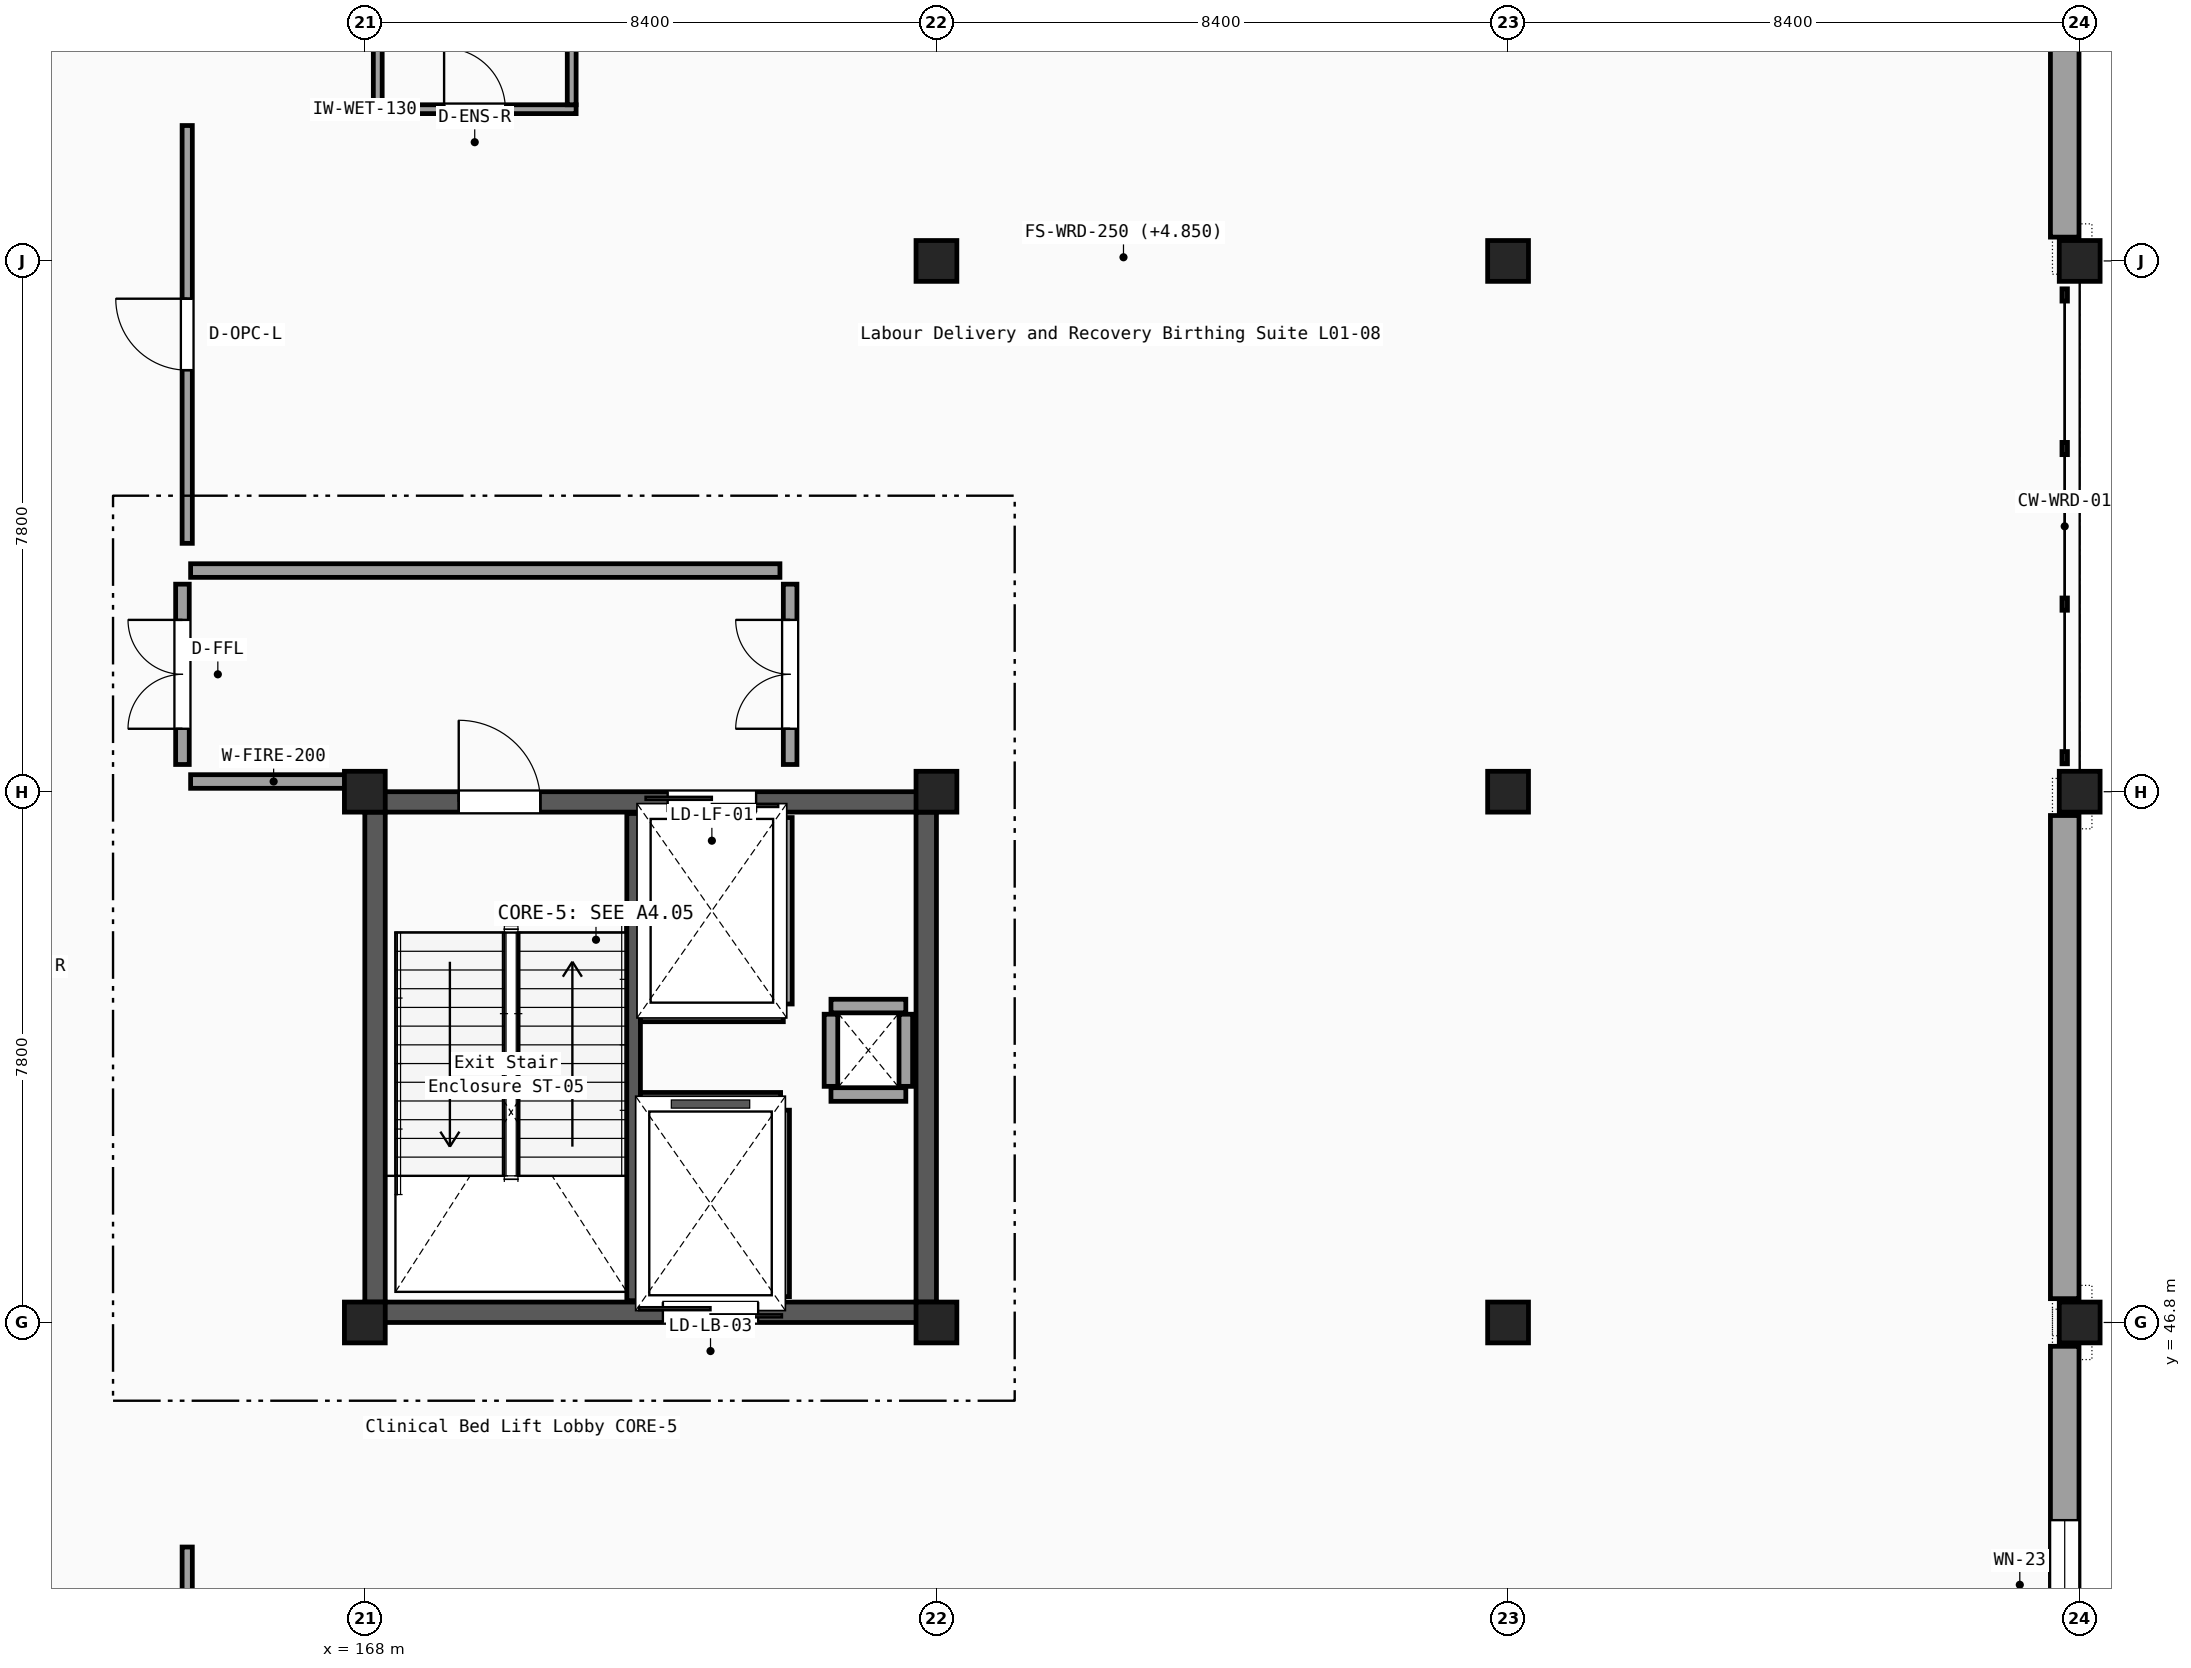
"""IFC4 building model, lengths in metres.
Left out: names, types, materials, properties, quantities, classifications, styles, units other than length and angle.
Written with IfcOpenShell. Run it as: python <this file> out.ifc"""

import sys

from ifc_helpers import new_model, si_unit, direction, frame, frame_2d, origin, origin_2d, place, context, subcontext, project, spatial, rectangle, i_section, extrude, element, fill, save


model = new_model("IFC4")
c1 = context("Model", 3, precision=1e-05, world=origin(), true_north=direction((0.0, 1.0)))
c2 = subcontext(c1, "Body", "Model", "MODEL_VIEW")
j1 = project(units=[si_unit("LENGTHUNIT", "METRE"), si_unit("PLANEANGLEUNIT", "RADIAN")], contexts=[c1])
p1 = place(None, origin())
s1 = spatial("IfcSite", under=j1, at=p1, CompositionType="ELEMENT")
p2 = place(p1, origin())
s2 = spatial("IfcBuilding", under=s1, at=p2, CompositionType="ELEMENT")
p3 = place(p2, frame((0.0, 0.0, 5.1)))
s3 = spatial("IfcBuildingStorey", under=s2, at=p3, CompositionType="ELEMENT", Elevation=5.1)
for number, where, z_axis, x_axis in (
    (1, (168.0, 46.8, 0.0), (0.0, 0.0, 1.0), (1.0, 0.0, 0.0)),
    (2, (168.0, 54.6, 0.0), (0.0, 0.0, 1.0), (1.0, 0.0, 0.0)),
    (3, (176.4, 46.8, 0.0), (0.0, 0.0, 1.0), (1.0, 0.0, 0.0)),
    (4, (176.4, 54.6, 0.0), (0.0, 0.0, 1.0), (1.0, 0.0, 0.0)),
    (5, (176.4, 62.4, 0.0), (0.0, 0.0, 1.0), (1.0, 0.0, 0.0)),
    (6, (184.8, 46.8, 0.0), (0.0, 0.0, 1.0), (1.0, 0.0, 0.0)),
    (7, (184.8, 54.6, 0.0), (0.0, 0.0, 1.0), (1.0, 0.0, 0.0)),
    (8, (184.8, 62.4, 0.0), (0.0, 0.0, 1.0), (1.0, 0.0, 0.0)),
    (9, (193.2, 46.8, 0.0), (0.0, 0.0, 1.0), (1.0, 0.0, 0.0)),
    (10, (193.2, 54.6, 0.0), (0.0, 0.0, 1.0), (1.0, 0.0, 0.0)),
    (11, (193.2, 62.4, 0.0), (0.0, 0.0, 1.0), (1.0, 0.0, 0.0)),
):
    element("IfcColumn", number, at=place(p3, frame(where, z_axis=z_axis, x_axis=x_axis)), inside=s3, PredefinedType="COLUMN", context=c2, shape_type="SweptSolid", body=[
        extrude(i_section(OverallWidth=0.3, OverallDepth=0.6, WebThickness=0.015, FlangeThickness=0.03, FilletRadius=0.027, at=origin_2d()), origin(), (0.0, 0.0, 1.0), 5.1),
    ])
p4 = place(p3, frame((192.98, 39.44, 0.0), z_axis=(0.0, 0.0, 1.0), x_axis=(0.0, 1.0, 0.0)))
e12 = element("IfcWall", 12, at=p4, inside=s3, PredefinedType="SOLIDWALL", context=c2, shape_type="SweptSolid", body=[
    extrude(rectangle(XDim=7.01, YDim=0.42, at=frame_2d((3.505, 0.0))), origin(), (0.0, 0.0, 1.0), 4.33),
])
p5 = place(p4, frame((2.555, 0.0, 0.85)))
e13 = element("IfcOpeningElement", 13, at=p5, cuts=e12, PredefinedType="OPENING", context=c2, shape_type="SweptSolid", body=[
    extrude(rectangle(XDim=1.9, YDim=1.65, at=frame_2d((0.95, 0.825))), frame((0.0, 0.22, 0.0), z_axis=(0.0, -1.0, 0.0), x_axis=(1.0, 0.0, 0.0)), (0.0, 0.0, 1.0), 0.44),
])
for number, where, z_axis, x_axis in (
    (14, (192.98, 47.15, 0.0), (0.0, 0.0, 1.0), (0.0, 1.0, 0.0)),
    (15, (192.98, 62.75, 0.0), (0.0, 0.0, 1.0), (0.0, 1.0, 0.0)),
):
    element("IfcWall", number, at=place(p3, frame(where, z_axis=z_axis, x_axis=x_axis)), inside=s3, PredefinedType="SOLIDWALL", context=c2, shape_type="SweptSolid", body=[
        extrude(rectangle(XDim=7.1, YDim=0.42, at=frame_2d((3.55, 0.0))), origin(), (0.0, 0.0, 1.0), 4.33),
    ])
p6 = place(p3, frame((168.0, 46.95, 0.0), z_axis=(0.0, 0.0, 1.0), x_axis=(1.0, 0.0, 0.0)))
e16 = element("IfcWall", 16, at=p6, inside=s3, PredefinedType="SHEAR", context=c2, shape_type="SweptSolid", body=[
    extrude(rectangle(XDim=8.4, YDim=0.3, at=frame_2d((4.2, 0.0))), origin(), (0.0, 0.0, 1.0), 4.85),
])
p7 = place(p6, frame((4.38, 0.0, 0.0)))
e17 = element("IfcOpeningElement", 17, at=p7, cuts=e16, PredefinedType="OPENING", context=c2, shape_type="SweptSolid", body=[
    extrude(rectangle(XDim=1.4, YDim=2.2, at=frame_2d((0.7, 1.1))), frame((0.0, 0.16, 0.0), z_axis=(0.0, -1.0, 0.0), x_axis=(1.0, 0.0, 0.0)), (0.0, 0.0, 1.0), 0.32),
])
p8 = place(p3, frame((168.0, 54.45, 0.0), z_axis=(0.0, 0.0, 1.0), x_axis=(1.0, 0.0, 0.0)))
e18 = element("IfcWall", 18, at=p8, inside=s3, PredefinedType="SHEAR", context=c2, shape_type="SweptSolid", body=[
    extrude(rectangle(XDim=8.4, YDim=0.3, at=frame_2d((4.2, 0.0))), origin(), (0.0, 0.0, 1.0), 4.85),
])
p9 = place(p8, frame((1.38, 0.0, 0.0)))
e19 = element("IfcOpeningElement", 19, at=p9, cuts=e18, PredefinedType="OPENING", context=c2, shape_type="SweptSolid", body=[
    extrude(rectangle(XDim=1.2, YDim=2.15, at=frame_2d((0.6, 1.075))), frame((0.0, 0.16, 0.0), z_axis=(0.0, -1.0, 0.0), x_axis=(1.0, 0.0, 0.0)), (0.0, 0.0, 1.0), 0.32),
])
p10 = place(p8, frame((4.45, 0.0, 0.0)))
e20 = element("IfcOpeningElement", 20, at=p10, cuts=e18, PredefinedType="OPENING", context=c2, shape_type="SweptSolid", body=[
    extrude(rectangle(XDim=1.3, YDim=2.2, at=frame_2d((0.65, 1.1))), frame((0.0, 0.16, 0.0), z_axis=(0.0, -1.0, 0.0), x_axis=(1.0, 0.0, 0.0)), (0.0, 0.0, 1.0), 0.32),
])
for number, where, z_axis, x_axis in (
    (21, (168.15, 47.1, 0.0), (0.0, 0.0, 1.0), (0.0, 1.0, 0.0)),
    (22, (176.25, 47.1, 0.0), (0.0, 0.0, 1.0), (0.0, 1.0, 0.0)),
):
    element("IfcWall", number, at=place(p3, frame(where, z_axis=z_axis, x_axis=x_axis)), inside=s3, PredefinedType="SHEAR", context=c2, shape_type="SweptSolid", body=[
        extrude(rectangle(XDim=7.2, YDim=0.3, at=frame_2d((3.6, 0.0))), origin(), (0.0, 0.0, 1.0), 4.85),
    ])
p11 = place(p3, frame((171.95, 47.12, 0.0), z_axis=(0.0, 0.0, 1.0), x_axis=(0.0, 1.0, 0.0)))
e23 = element("IfcWall", 23, at=p11, inside=s3, PredefinedType="SHEAR", context=c2, shape_type="SweptSolid", body=[
    extrude(rectangle(XDim=7.16, YDim=0.2, at=frame_2d((3.58, 0.0))), origin(), (0.0, 0.0, 1.0), 4.85),
])
for number, where, z_axis, x_axis in (
    (24, (174.85, 50.15, 0.0), (0.0, 0.0, 1.0), (1.0, 0.0, 0.0)),
    (25, (174.85, 51.45, 0.0), (0.0, 0.0, 1.0), (1.0, 0.0, 0.0)),
):
    element("IfcWall", number, at=place(p3, frame(where, z_axis=z_axis, x_axis=x_axis)), inside=s3, PredefinedType="PARTITIONING", context=c2, shape_type="SweptSolid", body=[
        extrude(rectangle(XDim=1.1, YDim=0.2, at=frame_2d((0.55, 0.0))), origin(), (0.0, 0.0, 1.0), 4.33),
    ])
for number, where, z_axis, x_axis in (
    (26, (174.85, 50.27, 0.0), (0.0, 0.0, 1.0), (0.0, 1.0, 0.0)),
    (27, (175.95, 50.27, 0.0), (0.0, 0.0, 1.0), (0.0, 1.0, 0.0)),
):
    element("IfcWall", number, at=place(p3, frame(where, z_axis=z_axis, x_axis=x_axis)), inside=s3, PredefinedType="PARTITIONING", context=c2, shape_type="SweptSolid", body=[
        extrude(rectangle(XDim=1.06, YDim=0.2, at=frame_2d((0.53, 0.0))), origin(), (0.0, 0.0, 1.0), 4.33),
    ])
p12 = place(p3, frame((174.18, 51.48, 0.0), z_axis=(0.0, 0.0, 1.0), x_axis=(0.0, 1.0, 0.0)))
e28 = element("IfcWall", 28, at=p12, inside=s3, PredefinedType="PARTITIONING", context=c2, shape_type="SweptSolid", body=[
    extrude(rectangle(XDim=2.74, YDim=0.2, at=frame_2d((1.37, 0.0))), origin(), (0.0, 0.0, 1.0), 4.33),
])
p13 = place(p3, frame((172.05, 51.32, 0.0), z_axis=(0.0, 0.0, 1.0), x_axis=(1.0, 0.0, 0.0)))
e29 = element("IfcWall", 29, at=p13, inside=s3, PredefinedType="PARTITIONING", context=c2, shape_type="SweptSolid", body=[
    extrude(rectangle(XDim=2.1, YDim=0.2, at=frame_2d((1.05, 0.0))), origin(), (0.0, 0.0, 1.0), 4.33),
])
p14 = place(p3, frame((174.14, 47.18, 0.0), z_axis=(0.0, 0.0, 1.0), x_axis=(0.0, 1.0, 0.0)))
e30 = element("IfcWall", 30, at=p14, inside=s3, PredefinedType="PARTITIONING", context=c2, shape_type="SweptSolid", body=[
    extrude(rectangle(XDim=2.74, YDim=0.2, at=frame_2d((1.37, 0.0))), origin(), (0.0, 0.0, 1.0), 4.33),
])
p15 = place(p3, frame((172.05, 50.08, 0.0), z_axis=(0.0, 0.0, 1.0), x_axis=(1.0, 0.0, 0.0)))
e31 = element("IfcWall", 31, at=p15, inside=s3, PredefinedType="PARTITIONING", context=c2, shape_type="SweptSolid", body=[
    extrude(rectangle(XDim=2.06, YDim=0.2, at=frame_2d((1.03, 0.0))), origin(), (0.0, 0.0, 1.0), 4.33),
])
p16 = place(p3, frame((165.44, 54.75, 0.0), z_axis=(0.0, 0.0, 1.0), x_axis=(1.0, 0.0, 0.0)))
e32 = element("IfcWall", 32, at=p16, inside=s3, PredefinedType="PARTITIONING", context=c2, shape_type="SweptSolid", body=[
    extrude(rectangle(XDim=2.44, YDim=0.2, at=frame_2d((1.22, 0.0))), origin(), (0.0, 0.0, 1.0), 4.33),
])
p17 = place(p3, frame((165.44, 57.85, 0.0), z_axis=(0.0, 0.0, 1.0), x_axis=(1.0, 0.0, 0.0)))
e33 = element("IfcWall", 33, at=p17, inside=s3, PredefinedType="PARTITIONING", context=c2, shape_type="SweptSolid", body=[
    extrude(rectangle(XDim=8.66, YDim=0.2, at=frame_2d((4.33, 0.0))), origin(), (0.0, 0.0, 1.0), 4.33),
])
p18 = place(p3, frame((165.32, 55.0, 0.0), z_axis=(0.0, 0.0, 1.0), x_axis=(0.0, 1.0, 0.0)))
e34 = element("IfcWall", 34, at=p18, inside=s3, PredefinedType="PARTITIONING", context=c2, shape_type="SweptSolid", body=[
    extrude(rectangle(XDim=2.65, YDim=0.2, at=frame_2d((1.325, 0.0))), origin(), (0.0, 0.0, 1.0), 4.33),
])
p19 = place(p18, frame((0.525, 0.0, 0.0)))
e35 = element("IfcOpeningElement", 35, at=p19, cuts=e34, PredefinedType="OPENING", context=c2, shape_type="SweptSolid", body=[
    extrude(rectangle(XDim=1.6, YDim=2.2, at=frame_2d((0.8, 1.1))), frame((0.0, 0.11, 0.0), z_axis=(0.0, -1.0, 0.0), x_axis=(1.0, 0.0, 0.0)), (0.0, 0.0, 1.0), 0.22),
])
p20 = place(p3, frame((174.25, 55.0, 0.0), z_axis=(0.0, 0.0, 1.0), x_axis=(0.0, 1.0, 0.0)))
e36 = element("IfcWall", 36, at=p20, inside=s3, PredefinedType="PARTITIONING", context=c2, shape_type="SweptSolid", body=[
    extrude(rectangle(XDim=2.65, YDim=0.2, at=frame_2d((1.325, 0.0))), origin(), (0.0, 0.0, 1.0), 4.33),
])
p21 = place(p20, frame((0.525, 0.0, 0.0)))
e37 = element("IfcOpeningElement", 37, at=p21, cuts=e36, PredefinedType="OPENING", context=c2, shape_type="SweptSolid", body=[
    extrude(rectangle(XDim=1.6, YDim=2.2, at=frame_2d((0.8, 1.1))), frame((0.0, 0.11, 0.0), z_axis=(0.0, -1.0, 0.0), x_axis=(1.0, 0.0, 0.0)), (0.0, 0.0, 1.0), 0.22),
])
p22 = place(p3, frame((165.39, 39.62, 0.0), z_axis=(0.0, 0.0, 1.0), x_axis=(0.0, 1.0, 0.0)))
e38 = element("IfcWall", 38, at=p22, inside=s3, PredefinedType="PARTITIONING", context=c2, shape_type="SweptSolid", body=[
    extrude(rectangle(XDim=3.88, YDim=0.15, at=frame_2d((1.94, 0.0))), origin(), (0.0, 0.0, 1.0), 4.82),
])
p23 = place(p22, frame((1.24, 0.0, 0.0)))
e39 = element("IfcOpeningElement", 39, at=p23, cuts=e38, PredefinedType="OPENING", context=c2, shape_type="SweptSolid", body=[
    extrude(rectangle(XDim=1.4, YDim=2.2, at=frame_2d((0.7, 1.1))), frame((0.0, 0.085, 0.0), z_axis=(0.0, -1.0, 0.0), x_axis=(1.0, 0.0, 0.0)), (0.0, 0.0, 1.0), 0.17),
])
p24 = place(p3, frame((165.39, 58.25, 0.0), z_axis=(0.0, 0.0, 1.0), x_axis=(0.0, 1.0, 0.0)))
e40 = element("IfcWall", 40, at=p24, inside=s3, PredefinedType="PARTITIONING", context=c2, shape_type="SweptSolid", body=[
    extrude(rectangle(XDim=6.14, YDim=0.15, at=frame_2d((3.07, 0.0))), origin(), (0.0, 0.0, 1.0), 4.33),
])
p25 = place(p24, frame((2.545, 0.0, 0.0)))
e41 = element("IfcOpeningElement", 41, at=p25, cuts=e40, PredefinedType="OPENING", context=c2, shape_type="SweptSolid", body=[
    extrude(rectangle(XDim=1.05, YDim=2.15, at=frame_2d((0.525, 1.075))), frame((0.0, 0.085, 0.0), z_axis=(0.0, -1.0, 0.0), x_axis=(1.0, 0.0, 0.0)), (0.0, 0.0, 1.0), 0.17),
])
p26 = place(p3, frame((168.125, 64.63, 0.0), z_axis=(0.0, 0.0, 1.0), x_axis=(1.0, 0.0, 0.0)))
e42 = element("IfcWall", 42, at=p26, inside=s3, PredefinedType="PARTITIONING", context=c2, shape_type="SweptSolid", body=[
    extrude(rectangle(XDim=2.98, YDim=0.13, at=frame_2d((1.49, 0.0))), origin(), (0.0, 0.0, 1.0), 4.38),
])
p27 = place(p26, frame((1.04, 0.0, 0.0)))
e43 = element("IfcOpeningElement", 43, at=p27, cuts=e42, PredefinedType="OPENING", context=c2, shape_type="SweptSolid", body=[
    extrude(rectangle(XDim=0.9, YDim=2.1, at=frame_2d((0.45, 1.05))), frame((0.0, 0.075, 0.0), z_axis=(0.0, -1.0, 0.0), x_axis=(1.0, 0.0, 0.0)), (0.0, 0.0, 1.0), 0.15),
])
p28 = place(p3, frame((168.19, 64.695, 0.0), z_axis=(0.0, 0.0, 1.0), x_axis=(0.0, 1.0, 0.0)))
e44 = element("IfcWall", 44, at=p28, inside=s3, PredefinedType="PARTITIONING", context=c2, shape_type="SweptSolid", body=[
    extrude(rectangle(XDim=2.22, YDim=0.13, at=frame_2d((1.11, 0.0))), origin(), (0.0, 0.0, 1.0), 4.38),
])
p29 = place(p3, frame((171.04, 64.695, 0.0), z_axis=(0.0, 0.0, 1.0), x_axis=(0.0, 1.0, 0.0)))
e45 = element("IfcWall", 45, at=p29, inside=s3, PredefinedType="PARTITIONING", context=c2, shape_type="SweptSolid", body=[
    extrude(rectangle(XDim=2.22, YDim=0.13, at=frame_2d((1.11, 0.0))), origin(), (0.0, 0.0, 1.0), 4.82),
])
p30 = place(p5, origin())
e46 = element("IfcWindow", 46, at=p30, inside=s3, PartitioningType="SINGLE_PANEL", PredefinedType="WINDOW", context=c2, shape_type="SweptSolid", body=[
    extrude(rectangle(XDim=1.9, YDim=1.65, at=frame_2d((0.95, 0.825))), frame((0.0, 0.03, 0.0), z_axis=(0.0, -1.0, 0.0), x_axis=(1.0, 0.0, 0.0)), (0.0, 0.0, 1.0), 0.06),
])
fill(e13, e46)
p31 = place(p9, origin())
e47 = element("IfcDoor", 47, at=p31, inside=s3, OperationType="SINGLE_SWING_LEFT", PredefinedType="DOOR", context=c2, shape_type="SweptSolid", body=[
    extrude(rectangle(XDim=1.2, YDim=2.15, at=frame_2d((0.6, 1.075))), frame((0.0, 0.025, 0.0), z_axis=(0.0, -1.0, 0.0), x_axis=(1.0, 0.0, 0.0)), (0.0, 0.0, 1.0), 0.05),
])
fill(e19, e47)
p32 = place(p10, origin())
e48 = element("IfcDoor", 48, at=p32, inside=s3, OperationType="DOUBLE_DOOR_SLIDING", PredefinedType="DOOR", context=c2, shape_type="SweptSolid", body=[
    extrude(rectangle(XDim=1.3, YDim=2.2, at=frame_2d((0.65, 1.1))), frame((0.0, 0.025, 0.0), z_axis=(0.0, -1.0, 0.0), x_axis=(1.0, 0.0, 0.0)), (0.0, 0.0, 1.0), 0.05),
])
fill(e20, e48)
p33 = place(p7, origin())
e49 = element("IfcDoor", 49, at=p33, inside=s3, OperationType="DOUBLE_DOOR_SLIDING", PredefinedType="DOOR", context=c2, shape_type="SweptSolid", body=[
    extrude(rectangle(XDim=1.4, YDim=2.2, at=frame_2d((0.7, 1.1))), frame((0.0, 0.025, 0.0), z_axis=(0.0, -1.0, 0.0), x_axis=(1.0, 0.0, 0.0)), (0.0, 0.0, 1.0), 0.05),
])
fill(e17, e49)
p34 = place(p19, origin())
e50 = element("IfcDoor", 50, at=p34, inside=s3, OperationType="DOUBLE_DOOR_SINGLE_SWING", PredefinedType="DOOR", context=c2, shape_type="SweptSolid", body=[
    extrude(rectangle(XDim=1.6, YDim=2.2, at=frame_2d((0.8, 1.1))), frame((0.0, 0.025, 0.0), z_axis=(0.0, -1.0, 0.0), x_axis=(1.0, 0.0, 0.0)), (0.0, 0.0, 1.0), 0.05),
])
fill(e35, e50)
p35 = place(p21, origin())
e51 = element("IfcDoor", 51, at=p35, inside=s3, OperationType="DOUBLE_DOOR_SINGLE_SWING", PredefinedType="DOOR", context=c2, shape_type="SweptSolid", body=[
    extrude(rectangle(XDim=1.6, YDim=2.2, at=frame_2d((0.8, 1.1))), frame((0.0, 0.025, 0.0), z_axis=(0.0, -1.0, 0.0), x_axis=(1.0, 0.0, 0.0)), (0.0, 0.0, 1.0), 0.05),
])
fill(e37, e51)
p36 = place(p25, origin())
e52 = element("IfcDoor", 52, at=p36, inside=s3, OperationType="SINGLE_SWING_RIGHT", PredefinedType="DOOR", context=c2, shape_type="SweptSolid", body=[
    extrude(rectangle(XDim=1.05, YDim=2.15, at=frame_2d((0.525, 1.075))), frame((0.0, 0.025, 0.0), z_axis=(0.0, -1.0, 0.0), x_axis=(1.0, 0.0, 0.0)), (0.0, 0.0, 1.0), 0.05),
])
fill(e41, e52)
p37 = place(p27, origin())
e53 = element("IfcDoor", 53, at=p37, inside=s3, OperationType="SINGLE_SWING_LEFT", PredefinedType="DOOR", context=c2, shape_type="SweptSolid", body=[
    extrude(rectangle(XDim=0.9, YDim=2.1, at=frame_2d((0.45, 1.05))), frame((0.0, 0.025, 0.0), z_axis=(0.0, -1.0, 0.0), x_axis=(1.0, 0.0, 0.0)), (0.0, 0.0, 1.0), 0.05),
])
fill(e43, e53)
save(model, sys.argv[1])
